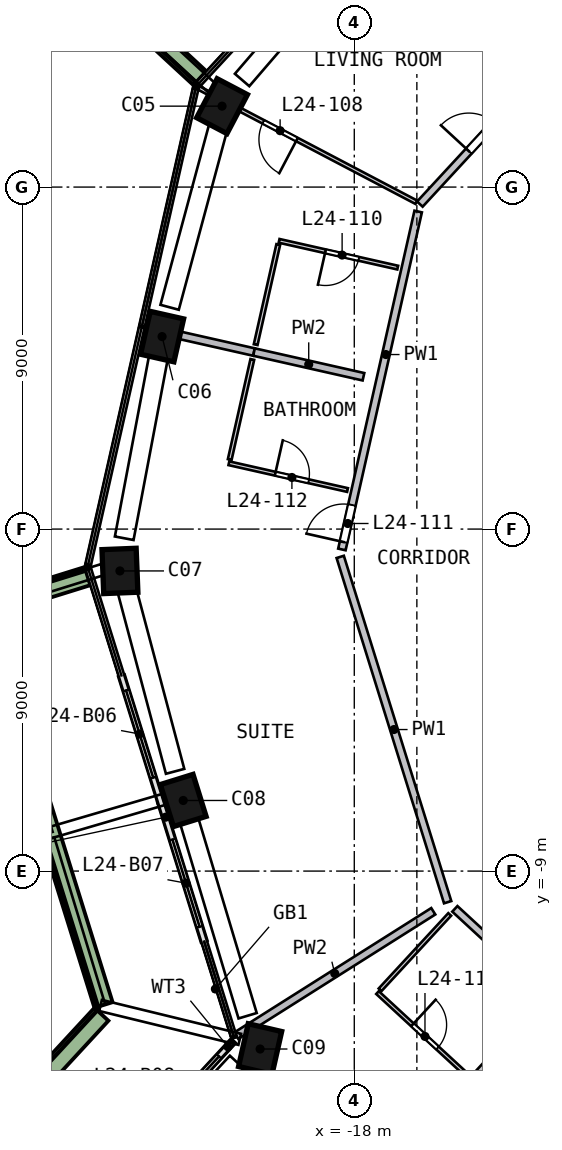
"""IFC4 building model, lengths in metres.
Left out: names, types, materials, properties, quantities, classifications, styles, units other than length and angle.
Written with IfcOpenShell. Run it as: python <this file> out.ifc"""

import sys

from ifc_helpers import new_model, si_unit, direction, frame, frame_2d, origin, origin_2d, place, context, subcontext, project, spatial, rectangle, extrude, element, fill, save


model = new_model("IFC4")
c1 = context("Model", 3, precision=1e-05, world=origin(), true_north=direction((0.0, 1.0)))
c2 = subcontext(c1, "Body", "Model", "MODEL_VIEW")
j1 = project(units=[si_unit("LENGTHUNIT", "METRE"), si_unit("PLANEANGLEUNIT", "RADIAN")], contexts=[c1])
p1 = place(None, origin())
s1 = spatial("IfcSite", under=j1, at=p1, CompositionType="ELEMENT")
p2 = place(p1, origin())
s2 = spatial("IfcBuilding", under=s1, at=p2, CompositionType="ELEMENT")
p3 = place(p2, frame((0.0, 0.0, 103.5)))
s3 = spatial("IfcBuildingStorey", under=s2, at=p3, CompositionType="ELEMENT", Elevation=103.5)
p4 = place(p3, frame((-21.416, 11.253, 0.0), z_axis=(-0.052686348, -0.10225561, 0.993361937), x_axis=(0.462460096, 0.879147052, 0.115026606)))
e1 = element("IfcColumn", 1, at=p4, inside=s3, PredefinedType="COLUMN", context=c2, shape_type="SweptSolid", body=[
    extrude(rectangle(XDim=1.15, YDim=0.9, at=origin_2d()), origin(), (0.0, 0.0, 1.0), 3.211),
])
p5 = place(p3, frame((-23.029, 5.198, 0.0), z_axis=(-0.023879798, -0.109740599, 0.993673365), x_axis=(-0.219512496, -0.969124304, -0.112304706)))
e2 = element("IfcColumn", 2, at=p5, inside=s3, PredefinedType="COLUMN", context=c2, shape_type="SweptSolid", body=[
    extrude(rectangle(XDim=1.15, YDim=0.9, at=origin_2d()), origin(), (0.0, 0.0, 1.0), 3.21),
])
p6 = place(p3, frame((-24.174, -0.962, 0.0), z_axis=(0.005549897, -0.114951301, 0.993355625), x_axis=(-0.039478608, 0.992571296, 0.115081107)))
e3 = element("IfcColumn", 3, at=p6, inside=s3, PredefinedType="COLUMN", context=c2, shape_type="SweptSolid", body=[
    extrude(rectangle(XDim=1.15, YDim=0.9, at=origin_2d()), origin(), (0.0, 0.0, 1.0), 3.211),
])
p7 = place(p3, frame((-22.543, -7.013, 0.0), z_axis=(0.034222789, -0.106927204, 0.993677701), x_axis=(0.29485661, -0.948923521, -0.112266336)))
e4 = element("IfcColumn", 4, at=p7, inside=s3, PredefinedType="COLUMN", context=c2, shape_type="SweptSolid", body=[
    extrude(rectangle(XDim=1.15, YDim=0.9, at=origin_2d()), origin(), (0.0, 0.0, 1.0), 3.21),
])
p8 = place(p3, frame((-20.557, -13.565, 0.0), z_axis=(0.06529081, -0.09721414, 0.99311959), x_axis=(0.226403708, 0.970731294, 0.08013811)))
e5 = element("IfcColumn", 5, at=p8, inside=s3, PredefinedType="COLUMN", context=c2, shape_type="SweptSolid", body=[
    extrude(rectangle(XDim=1.15, YDim=0.9, at=origin_2d()), origin(), (0.0, 0.0, 1.0), 3.212),
])
p9 = place(p3, frame((-24.124, -3.865, 0.0), z_axis=(0.0, 0.0, 1.0), x_axis=(0.297046624, -0.954862976, 0.0)))
e6 = element("IfcWall", 6, at=p9, inside=s3, PredefinedType="SOLIDWALL", context=c2, shape_type="SweptSolid", body=[
    extrude(rectangle(XDim=3.475, YDim=0.15, at=frame_2d((1.737, 0.0))), origin(), (0.0, 0.0, 1.0), 2.425),
])
p10 = place(p9, frame((0.4, 0.0, 0.0)))
e7 = element("IfcOpeningElement", 7, at=p10, cuts=e6, PredefinedType="OPENING", context=c2, shape_type="SweptSolid", body=[
    extrude(rectangle(XDim=2.4, YDim=2.4, at=frame_2d((1.2, 1.2))), frame((0.0, 0.085, 0.0), z_axis=(0.0, -1.0, 0.0), x_axis=(1.0, 0.0, 0.0)), (0.0, 0.0, 1.0), 0.17),
])
p11 = place(p3, frame((-23.092, -7.183, 0.0), z_axis=(0.0, 0.0, 1.0), x_axis=(0.297049788, -0.954861992, 0.0)))
e8 = element("IfcWall", 8, at=p11, inside=s3, PredefinedType="SOLIDWALL", context=c2, shape_type="SweptSolid", body=[
    extrude(rectangle(XDim=3.836, YDim=0.15, at=frame_2d((1.918, 0.0))), origin(), (0.0, 0.0, 1.0), 2.425),
])
p12 = place(p11, frame((1.035, 0.0, 0.0)))
e9 = element("IfcOpeningElement", 9, at=p12, cuts=e8, PredefinedType="OPENING", context=c2, shape_type="SweptSolid", body=[
    extrude(rectangle(XDim=2.4, YDim=2.4, at=frame_2d((1.2, 1.2))), frame((0.0, 0.085, 0.0), z_axis=(0.0, -1.0, 0.0), x_axis=(1.0, 0.0, 0.0)), (0.0, 0.0, 1.0), 0.17),
])
p13 = place(p3, frame((-21.225, -13.515, 0.0), z_axis=(0.0, 0.0, 1.0), x_axis=(-0.678394477, -0.734697852, 0.0)))
e10 = element("IfcWall", 10, at=p13, inside=s3, PredefinedType="SOLIDWALL", context=c2, shape_type="SweptSolid", body=[
    extrude(rectangle(XDim=2.394, YDim=0.15, at=frame_2d((1.197, 0.0))), origin(), (0.0, 0.0, 1.0), 2.425),
])
p14 = place(p13, frame((0.494, 0.0, 0.0)))
e11 = element("IfcOpeningElement", 11, at=p14, cuts=e10, PredefinedType="OPENING", context=c2, shape_type="SweptSolid", body=[
    extrude(rectangle(XDim=1.5, YDim=2.4, at=frame_2d((0.75, 1.2))), frame((0.0, 0.085, 0.0), z_axis=(0.0, -1.0, 0.0), x_axis=(1.0, 0.0, 0.0)), (0.0, 0.0, 1.0), 0.17),
])
p15 = place(p3, frame((-24.046, 13.697, 0.0), z_axis=(0.0, 0.0, 1.0), x_axis=(0.734678586, -0.678415341, 0.0)))
e12 = element("IfcWall", 12, at=p15, inside=s3, PredefinedType="SOLIDWALL", context=c2, shape_type="SweptSolid", body=[
    extrude(rectangle(XDim=2.699, YDim=0.5, at=frame_2d((1.35, 0.0))), origin(), (0.0, 0.0, 1.0), 0.7),
])
p16 = place(p3, frame((-25.021, -1.238, 0.0), z_axis=(0.0, 0.0, 1.0), x_axis=(-0.954841862, -0.297114489, 0.0)))
e13 = element("IfcWall", 13, at=p16, inside=s3, PredefinedType="SOLIDWALL", context=c2, shape_type="SweptSolid", body=[
    extrude(rectangle(XDim=3.199, YDim=0.5, at=frame_2d((1.6, 0.0))), origin(), (0.0, 0.0, 1.0), 0.7),
])
p17 = place(p3, frame((-27.762, -2.353, 0.0), z_axis=(0.0, 0.0, 1.0), x_axis=(0.297028475, -0.954868622, 0.0)))
e14 = element("IfcWall", 14, at=p17, inside=s3, PredefinedType="SOLIDWALL", context=c2, shape_type="SweptSolid", body=[
    extrude(rectangle(XDim=10.652, YDim=0.5, at=frame_2d((5.326, 0.0))), origin(), (0.0, 0.0, 1.0), 0.7),
])
p18 = place(p3, frame((-24.653, -12.768, 0.0), z_axis=(0.0, 0.0, 1.0), x_axis=(-0.678410385, -0.734683162, 0.0)))
e15 = element("IfcWall", 15, at=p18, inside=s3, PredefinedType="SOLIDWALL", context=c2, shape_type="SweptSolid", body=[
    extrude(rectangle(XDim=8.794, YDim=0.5, at=frame_2d((4.397, 0.0))), origin(), (0.0, 0.0, 1.0), 0.7),
])
p19 = place(p3, frame((-24.485, -24.894, 0.0), z_axis=(0.0, 0.0, 1.0), x_axis=(0.678409972, 0.734683544, 0.0)))
e16 = element("IfcWall", 16, at=p19, inside=s3, PredefinedType="SOLIDWALL", context=c2, shape_type="SweptSolid", body=[
    extrude(rectangle(XDim=16.942, YDim=0.2, at=frame_2d((8.471, 0.0))), origin(), (0.0, 0.0, 1.0), 3.19),
])
p20 = place(p19, frame((2.15, 0.0, 0.0)))
e17 = element("IfcOpeningElement", 17, at=p20, cuts=e16, PredefinedType="OPENING", context=c2, shape_type="SweptSolid", body=[
    extrude(rectangle(XDim=1.0, YDim=2.1, at=frame_2d((0.5, 1.05))), frame((0.0, 0.11, 0.0), z_axis=(0.0, -1.0, 0.0), x_axis=(1.0, 0.0, 0.0)), (0.0, 0.0, 1.0), 0.22),
])
p21 = place(p3, frame((-18.326, -0.536, 0.0), z_axis=(0.0, 0.0, 1.0), x_axis=(0.220190181, 0.975456962, 0.0)))
e18 = element("IfcWall", 18, at=p21, inside=s3, PredefinedType="SOLIDWALL", context=c2, shape_type="SweptSolid", body=[
    extrude(rectangle(XDim=9.116, YDim=0.2, at=frame_2d((4.558, 0.0))), origin(), (0.0, 0.0, 1.0), 3.19),
])
p22 = place(p21, frame((0.2, 0.0, 0.0)))
e19 = element("IfcOpeningElement", 19, at=p22, cuts=e18, PredefinedType="OPENING", context=c2, shape_type="SweptSolid", body=[
    extrude(rectangle(XDim=1.0, YDim=2.1, at=frame_2d((0.5, 1.05))), frame((0.0, 0.11, 0.0), z_axis=(0.0, -1.0, 0.0), x_axis=(1.0, 0.0, 0.0)), (0.0, 0.0, 1.0), 0.22),
])
p23 = place(p3, frame((-11.375, -13.94, 0.0), z_axis=(0.0, 0.0, 1.0), x_axis=(-0.67841775, -0.734676361, 0.0)))
e20 = element("IfcWall", 20, at=p23, inside=s3, PredefinedType="SOLIDWALL", context=c2, shape_type="SweptSolid", body=[
    extrude(rectangle(XDim=16.942, YDim=0.2, at=frame_2d((8.471, 0.0))), origin(), (0.0, 0.0, 1.0), 3.19),
])
p24 = place(p23, frame((6.85, 0.0, 0.0)))
e21 = element("IfcOpeningElement", 21, at=p24, cuts=e20, PredefinedType="OPENING", context=c2, shape_type="SweptSolid", body=[
    extrude(rectangle(XDim=1.0, YDim=2.1, at=frame_2d((0.5, 1.05))), frame((0.0, 0.11, 0.0), z_axis=(0.0, -1.0, 0.0), x_axis=(1.0, 0.0, 0.0)), (0.0, 0.0, 1.0), 0.22),
])
p25 = place(p3, frame((-18.37, -0.732, 0.0), z_axis=(0.0, 0.0, 1.0), x_axis=(0.297037443, -0.954865832, 0.0)))
e22 = element("IfcWall", 22, at=p25, inside=s3, PredefinedType="SOLIDWALL", context=c2, shape_type="SweptSolid", body=[
    extrude(rectangle(XDim=9.516, YDim=0.2, at=frame_2d((4.758, 0.0))), origin(), (0.0, 0.0, 1.0), 3.19),
])
p26 = place(p3, frame((-15.354, -9.994, 0.0), z_axis=(0.0, 0.0, 1.0), x_axis=(0.734696063, -0.678396414, 0.0)))
e23 = element("IfcWall", 23, at=p26, inside=s3, PredefinedType="SOLIDWALL", context=c2, shape_type="SweptSolid", body=[
    extrude(rectangle(XDim=3.4, YDim=0.2, at=frame_2d((1.7, 0.0))), origin(), (0.0, 0.0, 1.0), 3.19),
])
p27 = place(p3, frame((-16.275, 8.552, 0.0), z_axis=(0.0, 0.0, 1.0), x_axis=(0.678430282, 0.734664789, 0.0)))
e24 = element("IfcWall", 24, at=p27, inside=s3, PredefinedType="SOLIDWALL", context=c2, shape_type="SweptSolid", body=[
    extrude(rectangle(XDim=9.317, YDim=0.2, at=frame_2d((4.658, 0.0))), origin(), (0.0, 0.0, 1.0), 3.19),
])
p28 = place(p27, frame((1.9, 0.0, 0.0)))
e25 = element("IfcOpeningElement", 25, at=p28, cuts=e24, PredefinedType="OPENING", context=c2, shape_type="SweptSolid", body=[
    extrude(rectangle(XDim=1.0, YDim=2.1, at=frame_2d((0.5, 1.05))), frame((0.0, 0.11, 0.0), z_axis=(0.0, -1.0, 0.0), x_axis=(1.0, 0.0, 0.0)), (0.0, 0.0, 1.0), 0.22),
])
p29 = place(p3, frame((-20.639, 4.659, 0.0), z_axis=(0.0, 0.0, 1.0), x_axis=(-0.975447311, 0.220232929, 0.0)))
e26 = element("IfcWall", 26, at=p29, inside=s3, PredefinedType="SOLIDWALL", context=c2, shape_type="SweptSolid", body=[
    extrude(rectangle(XDim=2.95, YDim=0.2, at=frame_2d((1.475, 0.0))), origin(), (0.0, 0.0, 1.0), 3.19),
])
p30 = place(p3, frame((-17.759, 4.009, 0.0), z_axis=(0.0, 0.0, 1.0), x_axis=(-0.975459908, 0.220177126, 0.0)))
e27 = element("IfcWall", 27, at=p30, inside=s3, PredefinedType="SOLIDWALL", context=c2, shape_type="SweptSolid", body=[
    extrude(rectangle(XDim=2.953, YDim=0.2, at=frame_2d((1.477, 0.0))), origin(), (0.0, 0.0, 1.0), 3.19),
])
p31 = place(p3, frame((-15.921, -10.057, 0.0), z_axis=(0.0, 0.0, 1.0), x_axis=(-0.845445381, -0.534061895, 0.0)))
e28 = element("IfcWall", 28, at=p31, inside=s3, PredefinedType="SOLIDWALL", context=c2, shape_type="SweptSolid", body=[
    extrude(rectangle(XDim=6.132, YDim=0.2, at=frame_2d((3.066, 0.0))), origin(), (0.0, 0.0, 1.0), 3.19),
])
for number, where, z_axis, x_axis in (
    (29, (-21.278, 1.83, 0.0), (0.0, 0.0, 1.0), (0.22, 0.975, 0.0)),
    (30, (-20.0, 7.488, 0.0), (0.0, 0.0, 1.0), (-0.22, -0.975, 0.0)),
):
    element("IfcWall", number, at=place(p3, frame(where, z_axis=z_axis, x_axis=x_axis)), inside=s3, PredefinedType="PARTITIONING", context=c2, shape_type="SweptSolid", body=[
        extrude(rectangle(XDim=2.7, YDim=0.1, at=frame_2d((1.35, 0.0))), origin(), (0.0, 0.0, 1.0), 3.19),
    ])
p32 = place(p3, frame((-21.3, 1.732, 0.0), z_axis=(0.0, 0.0, 1.0), x_axis=(0.975456335, -0.220192959, 0.0)))
e31 = element("IfcWall", 31, at=p32, inside=s3, PredefinedType="PARTITIONING", context=c2, shape_type="SweptSolid", body=[
    extrude(rectangle(XDim=3.2, YDim=0.1, at=frame_2d((1.6, 0.0))), origin(), (0.0, 0.0, 1.0), 3.19),
])
p33 = place(p32, frame((1.25, 0.0, 0.0)))
e32 = element("IfcOpeningElement", 32, at=p33, cuts=e31, PredefinedType="OPENING", context=c2, shape_type="SweptSolid", body=[
    extrude(rectangle(XDim=0.9, YDim=2.1, at=frame_2d((0.45, 1.05))), frame((0.0, 0.06, 0.0), z_axis=(0.0, -1.0, 0.0), x_axis=(1.0, 0.0, 0.0)), (0.0, 0.0, 1.0), 0.12),
])
p34 = place(p3, frame((-16.366, 8.6, 0.0), z_axis=(0.0, 0.0, 1.0), x_axis=(-0.885235319, 0.465143451, 0.0)))
e33 = element("IfcWall", 33, at=p34, inside=s3, PredefinedType="PARTITIONING", context=c2, shape_type="SweptSolid", body=[
    extrude(rectangle(XDim=6.476, YDim=0.1, at=frame_2d((3.238, 0.0))), origin(), (0.0, 0.0, 1.0), 3.19),
])
p35 = place(p34, frame((3.55, 0.0, 0.0)))
e34 = element("IfcOpeningElement", 34, at=p35, cuts=e33, PredefinedType="OPENING", context=c2, shape_type="SweptSolid", body=[
    extrude(rectangle(XDim=1.0, YDim=2.1, at=frame_2d((0.5, 1.05))), frame((0.0, 0.06, 0.0), z_axis=(0.0, -1.0, 0.0), x_axis=(1.0, 0.0, 0.0)), (0.0, 0.0, 1.0), 0.12),
])
p36 = place(p3, frame((-16.857, 6.881, 0.0), z_axis=(0.0, 0.0, 1.0), x_axis=(-0.975460033, 0.220176573, 0.0)))
e35 = element("IfcWall", 35, at=p36, inside=s3, PredefinedType="PARTITIONING", context=c2, shape_type="SweptSolid", body=[
    extrude(rectangle(XDim=3.2, YDim=0.1, at=frame_2d((1.6, 0.0))), origin(), (0.0, 0.0, 1.0), 3.19),
])
p37 = place(p36, frame((1.05, 0.0, 0.0)))
e36 = element("IfcOpeningElement", 36, at=p37, cuts=e35, PredefinedType="OPENING", context=c2, shape_type="SweptSolid", body=[
    extrude(rectangle(XDim=0.9, YDim=2.1, at=frame_2d((0.45, 1.05))), frame((0.0, 0.06, 0.0), z_axis=(0.0, -1.0, 0.0), x_axis=(1.0, 0.0, 0.0)), (0.0, 0.0, 1.0), 0.12),
])
p38 = place(p3, frame((-15.489, -10.141, 0.0), z_axis=(0.0, 0.0, 1.0), x_axis=(-0.678426553, -0.734668232, 0.0)))
e37 = element("IfcWall", 37, at=p38, inside=s3, PredefinedType="PARTITIONING", context=c2, shape_type="SweptSolid", body=[
    extrude(rectangle(XDim=2.7, YDim=0.1, at=frame_2d((1.35, 0.0))), origin(), (0.0, 0.0, 1.0), 3.19),
])
p39 = place(p3, frame((-17.389, -12.198, 0.0), z_axis=(0.0, 0.0, 1.0), x_axis=(0.734698137, -0.678394168, 0.0)))
e38 = element("IfcWall", 38, at=p39, inside=s3, PredefinedType="PARTITIONING", context=c2, shape_type="SweptSolid", body=[
    extrude(rectangle(XDim=3.2, YDim=0.1, at=frame_2d((1.6, 0.0))), origin(), (0.0, 0.0, 1.0), 3.19),
])
p40 = place(p39, frame((1.25, 0.0, 0.0)))
e39 = element("IfcOpeningElement", 39, at=p40, cuts=e38, PredefinedType="OPENING", context=c2, shape_type="SweptSolid", body=[
    extrude(rectangle(XDim=0.9, YDim=2.1, at=frame_2d((0.45, 1.05))), frame((0.0, 0.06, 0.0), z_axis=(0.0, -1.0, 0.0), x_axis=(1.0, 0.0, 0.0)), (0.0, 0.0, 1.0), 0.12),
])
p41 = place(p3, frame((-17.712, 16.355, 0.0), z_axis=(0.0, 0.0, 1.0), x_axis=(0.734672545, -0.678421883, 0.0)))
e40 = element("IfcWall", 40, at=p41, inside=s3, PredefinedType="PARTITIONING", context=c2, shape_type="SweptSolid", body=[
    extrude(rectangle(XDim=6.15, YDim=0.1, at=frame_2d((3.075, 0.0))), origin(), (0.0, 0.0, 1.0), 3.19),
])
p42 = place(p41, frame((1.8, 0.0, 0.0)))
e41 = element("IfcOpeningElement", 41, at=p42, cuts=e40, PredefinedType="OPENING", context=c2, shape_type="SweptSolid", body=[
    extrude(rectangle(XDim=1.0, YDim=2.1, at=frame_2d((0.5, 1.05))), frame((0.0, 0.06, 0.0), z_axis=(0.0, -1.0, 0.0), x_axis=(1.0, 0.0, 0.0)), (0.0, 0.0, 1.0), 0.12),
])
p43 = place(p10, origin())
e42 = element("IfcDoor", 42, at=p43, inside=s3, OperationType="SLIDING_TO_RIGHT", PredefinedType="DOOR", context=c2, shape_type="SweptSolid", body=[
    extrude(rectangle(XDim=2.4, YDim=2.4, at=frame_2d((1.2, 1.2))), frame((0.0, 0.025, 0.0), z_axis=(0.0, -1.0, 0.0), x_axis=(1.0, 0.0, 0.0)), (0.0, 0.0, 1.0), 0.05),
])
fill(e7, e42)
p44 = place(p12, origin())
e43 = element("IfcDoor", 43, at=p44, inside=s3, OperationType="SLIDING_TO_LEFT", PredefinedType="DOOR", context=c2, shape_type="SweptSolid", body=[
    extrude(rectangle(XDim=2.4, YDim=2.4, at=frame_2d((1.2, 1.2))), frame((0.0, 0.025, 0.0), z_axis=(0.0, -1.0, 0.0), x_axis=(1.0, 0.0, 0.0)), (0.0, 0.0, 1.0), 0.05),
])
fill(e9, e43)
p45 = place(p14, origin())
e44 = element("IfcDoor", 44, at=p45, inside=s3, OperationType="SLIDING_TO_LEFT", PredefinedType="DOOR", context=c2, shape_type="SweptSolid", body=[
    extrude(rectangle(XDim=1.5, YDim=2.4, at=frame_2d((0.75, 1.2))), frame((0.0, 0.025, 0.0), z_axis=(0.0, -1.0, 0.0), x_axis=(1.0, 0.0, 0.0)), (0.0, 0.0, 1.0), 0.05),
])
fill(e11, e44)
p46 = place(p28, origin())
e45 = element("IfcDoor", 45, at=p46, inside=s3, OperationType="SINGLE_SWING_LEFT", PredefinedType="DOOR", context=c2, shape_type="SweptSolid", body=[
    extrude(rectangle(XDim=1.0, YDim=2.1, at=frame_2d((0.5, 1.05))), frame((0.0, 0.025, 0.0), z_axis=(0.0, -1.0, 0.0), x_axis=(1.0, 0.0, 0.0)), (0.0, 0.0, 1.0), 0.05),
])
fill(e25, e45)
p47 = place(p35, origin())
e46 = element("IfcDoor", 46, at=p47, inside=s3, OperationType="SINGLE_SWING_LEFT", PredefinedType="DOOR", context=c2, shape_type="SweptSolid", body=[
    extrude(rectangle(XDim=1.0, YDim=2.1, at=frame_2d((0.5, 1.05))), frame((0.0, 0.025, 0.0), z_axis=(0.0, -1.0, 0.0), x_axis=(1.0, 0.0, 0.0)), (0.0, 0.0, 1.0), 0.05),
])
fill(e34, e46)
p48 = place(p37, origin())
e47 = element("IfcDoor", 47, at=p48, inside=s3, OperationType="SINGLE_SWING_RIGHT", PredefinedType="DOOR", context=c2, shape_type="SweptSolid", body=[
    extrude(rectangle(XDim=0.9, YDim=2.1, at=frame_2d((0.45, 1.05))), frame((0.0, 0.025, 0.0), z_axis=(0.0, -1.0, 0.0), x_axis=(1.0, 0.0, 0.0)), (0.0, 0.0, 1.0), 0.05),
])
fill(e36, e47)
p49 = place(p22, origin())
e48 = element("IfcDoor", 48, at=p49, inside=s3, OperationType="SINGLE_SWING_LEFT", PredefinedType="DOOR", context=c2, shape_type="SweptSolid", body=[
    extrude(rectangle(XDim=1.0, YDim=2.1, at=frame_2d((0.5, 1.05))), frame((0.0, 0.025, 0.0), z_axis=(0.0, -1.0, 0.0), x_axis=(1.0, 0.0, 0.0)), (0.0, 0.0, 1.0), 0.05),
])
fill(e19, e48)
p50 = place(p33, origin())
e49 = element("IfcDoor", 49, at=p50, inside=s3, OperationType="SINGLE_SWING_LEFT", PredefinedType="DOOR", context=c2, shape_type="SweptSolid", body=[
    extrude(rectangle(XDim=0.9, YDim=2.1, at=frame_2d((0.45, 1.05))), frame((0.0, 0.025, 0.0), z_axis=(0.0, -1.0, 0.0), x_axis=(1.0, 0.0, 0.0)), (0.0, 0.0, 1.0), 0.05),
])
fill(e32, e49)
p51 = place(p40, origin())
e50 = element("IfcDoor", 50, at=p51, inside=s3, OperationType="SINGLE_SWING_LEFT", PredefinedType="DOOR", context=c2, shape_type="SweptSolid", body=[
    extrude(rectangle(XDim=0.9, YDim=2.1, at=frame_2d((0.45, 1.05))), frame((0.0, 0.025, 0.0), z_axis=(0.0, -1.0, 0.0), x_axis=(1.0, 0.0, 0.0)), (0.0, 0.0, 1.0), 0.05),
])
fill(e39, e50)
save(model, sys.argv[1])
